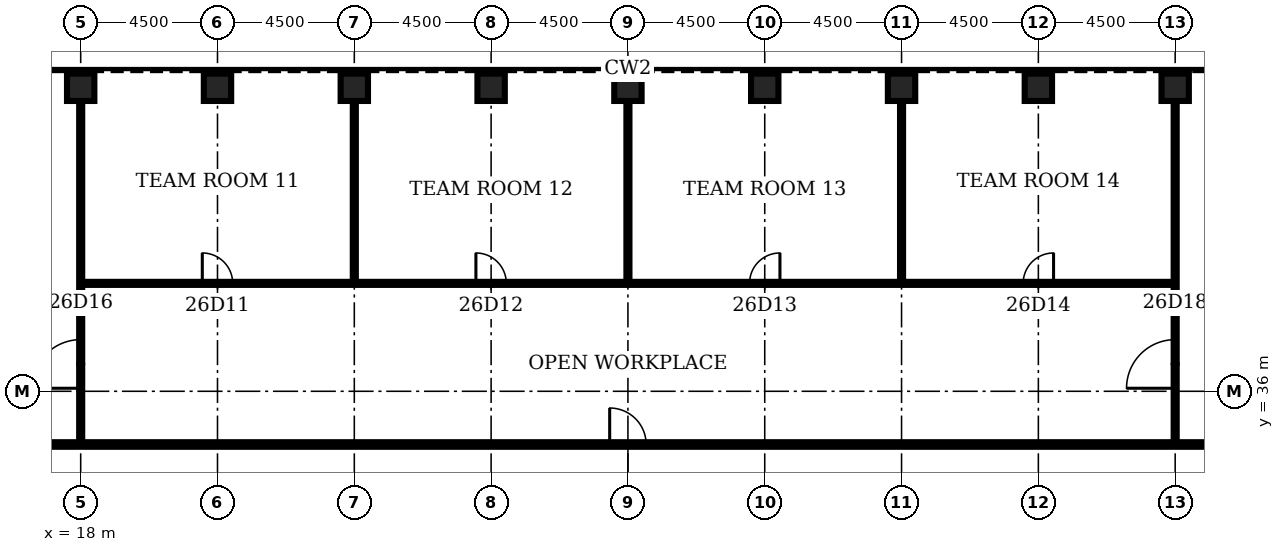
"""IFC4 building model, lengths in metres.
Left out: names, types, materials, properties, quantities, classifications, styles, units other than length and angle.
Written with IfcOpenShell. Run it as: python <this file> out.ifc"""

import sys

from ifc_helpers import new_model, si_unit, direction, frame, frame_2d, origin, origin_2d, place, context, subcontext, project, spatial, rectangle, hollow_rectangle, extrude, element, fill, save


model = new_model("IFC4")
c1 = context("Model", 3, precision=1e-05, world=origin(), true_north=direction((0.0, 1.0)))
c2 = subcontext(c1, "Body", "Model", "MODEL_VIEW")
j1 = project(units=[si_unit("LENGTHUNIT", "METRE"), si_unit("PLANEANGLEUNIT", "RADIAN")], contexts=[c1])
p1 = place(None, origin())
s1 = spatial("IfcSite", under=j1, at=p1, CompositionType="ELEMENT")
p2 = place(p1, origin())
s2 = spatial("IfcBuilding", under=s1, at=p2, CompositionType="ELEMENT")
p3 = place(p2, frame((0.0, 0.0, 121.5)))
s3 = spatial("IfcBuildingStorey", under=s2, at=p3, CompositionType="ELEMENT", Elevation=121.5)
for number, where, z_axis, x_axis in (
    (1, (54.0, 46.0, 0.0), (0.0, 0.0, 1.0), (0.0, 1.0, 0.0)),
    (2, (49.5, 46.0, 0.0), (0.0, 0.0, 1.0), (0.0, 1.0, 0.0)),
    (3, (45.0, 46.0, 0.0), (0.0, 0.0, 1.0), (0.0, 1.0, 0.0)),
    (4, (40.5, 46.0, 0.0), (0.0, 0.0, 1.0), (0.0, 1.0, 0.0)),
    (5, (36.0, 46.0, 0.0), (0.0, 0.0, 1.0), (0.0, 1.0, 0.0)),
    (6, (31.5, 46.0, 0.0), (0.0, 0.0, 1.0), (0.0, 1.0, 0.0)),
    (7, (27.0, 46.0, 0.0), (0.0, 0.0, 1.0), (0.0, 1.0, 0.0)),
    (8, (22.5, 46.0, 0.0), (0.0, 0.0, 1.0), (0.0, 1.0, 0.0)),
    (9, (18.0, 46.0, 0.0), (0.0, 0.0, 1.0), (0.0, 1.0, 0.0)),
):
    element("IfcColumn", number, at=place(p3, frame(where, z_axis=z_axis, x_axis=x_axis)), inside=s3, PredefinedType="COLUMN", context=c2, shape_type="SweptSolid", body=[
        extrude(hollow_rectangle(XDim=0.9, YDim=0.9, WallThickness=0.1, at=origin_2d()), origin(), (0.0, 0.0, 1.0), 4.2),
    ])
p4 = place(p3, frame((15.15, 34.25, 0.0), z_axis=(0.0, 0.0, 1.0), x_axis=(1.0, 0.0, 0.0)))
e10 = element("IfcWall", 10, at=p4, inside=s3, PredefinedType="PARTITIONING", context=c2, shape_type="SweptSolid", body=[
    extrude(rectangle(XDim=41.7, YDim=0.15, at=frame_2d((20.85, 0.0))), origin(), (0.0, 0.0, 1.0), 3.0),
])
p5 = place(p4, frame((20.25, 0.0, 0.0)))
e11 = element("IfcOpeningElement", 11, at=p5, cuts=e10, PredefinedType="OPENING", context=c2, shape_type="SweptSolid", body=[
    extrude(rectangle(XDim=1.2, YDim=2.1, at=frame_2d((0.6, 1.05))), frame((0.0, 0.085, 0.0), z_axis=(0.0, -1.0, 0.0), x_axis=(1.0, 0.0, 0.0)), (0.0, 0.0, 1.0), 0.17),
])
p6 = place(p3, frame((18.0, 39.55, 0.0), z_axis=(0.0, 0.0, 1.0), x_axis=(1.0, 0.0, 0.0)))
e12 = element("IfcWall", 12, at=p6, inside=s3, PredefinedType="PARTITIONING", context=c2, shape_type="SweptSolid", body=[
    extrude(rectangle(XDim=36.0, YDim=0.1, at=frame_2d((18.0, 0.0))), origin(), (0.0, 0.0, 1.0), 3.0),
])
p7 = place(p6, frame((4.0, 0.0, 0.0)))
e13 = element("IfcOpeningElement", 13, at=p7, cuts=e12, PredefinedType="OPENING", context=c2, shape_type="SweptSolid", body=[
    extrude(rectangle(XDim=1.0, YDim=2.1, at=frame_2d((0.5, 1.05))), frame((0.0, 0.06, 0.0), z_axis=(0.0, -1.0, 0.0), x_axis=(1.0, 0.0, 0.0)), (0.0, 0.0, 1.0), 0.12),
])
p8 = place(p6, frame((13.0, 0.0, 0.0)))
e14 = element("IfcOpeningElement", 14, at=p8, cuts=e12, PredefinedType="OPENING", context=c2, shape_type="SweptSolid", body=[
    extrude(rectangle(XDim=1.0, YDim=2.1, at=frame_2d((0.5, 1.05))), frame((0.0, 0.06, 0.0), z_axis=(0.0, -1.0, 0.0), x_axis=(1.0, 0.0, 0.0)), (0.0, 0.0, 1.0), 0.12),
])
p9 = place(p6, frame((22.0, 0.0, 0.0)))
e15 = element("IfcOpeningElement", 15, at=p9, cuts=e12, PredefinedType="OPENING", context=c2, shape_type="SweptSolid", body=[
    extrude(rectangle(XDim=1.0, YDim=2.1, at=frame_2d((0.5, 1.05))), frame((0.0, 0.06, 0.0), z_axis=(0.0, -1.0, 0.0), x_axis=(1.0, 0.0, 0.0)), (0.0, 0.0, 1.0), 0.12),
])
p10 = place(p6, frame((31.0, 0.0, 0.0)))
e16 = element("IfcOpeningElement", 16, at=p10, cuts=e12, PredefinedType="OPENING", context=c2, shape_type="SweptSolid", body=[
    extrude(rectangle(XDim=1.0, YDim=2.1, at=frame_2d((0.5, 1.05))), frame((0.0, 0.06, 0.0), z_axis=(0.0, -1.0, 0.0), x_axis=(1.0, 0.0, 0.0)), (0.0, 0.0, 1.0), 0.12),
])
p11 = place(p3, frame((18.0, 34.25, 0.0), z_axis=(0.0, 0.0, 1.0), x_axis=(0.0, 1.0, 0.0)))
e17 = element("IfcWall", 17, at=p11, inside=s3, PredefinedType="PARTITIONING", context=c2, shape_type="SweptSolid", body=[
    extrude(rectangle(XDim=11.3, YDim=0.1, at=frame_2d((5.65, 0.0))), origin(), (0.0, 0.0, 1.0), 3.0),
])
p12 = place(p11, frame((1.85, 0.0, 0.0)))
e18 = element("IfcOpeningElement", 18, at=p12, cuts=e17, PredefinedType="OPENING", context=c2, shape_type="SweptSolid", body=[
    extrude(rectangle(XDim=1.6, YDim=2.1, at=frame_2d((0.8, 1.05))), frame((0.0, 0.06, 0.0), z_axis=(0.0, -1.0, 0.0), x_axis=(1.0, 0.0, 0.0)), (0.0, 0.0, 1.0), 0.12),
])
for number, where, z_axis, x_axis in (
    (19, (27.0, 39.55, 0.0), (0.0, 0.0, 1.0), (0.0, 1.0, 0.0)),
    (20, (36.0, 39.55, 0.0), (0.0, 0.0, 1.0), (0.0, 1.0, 0.0)),
    (21, (45.0, 39.55, 0.0), (0.0, 0.0, 1.0), (0.0, 1.0, 0.0)),
):
    element("IfcWall", number, at=place(p3, frame(where, z_axis=z_axis, x_axis=x_axis)), inside=s3, PredefinedType="PARTITIONING", context=c2, shape_type="SweptSolid", body=[
        extrude(rectangle(XDim=6.0, YDim=0.1, at=frame_2d((3.0, 0.0))), origin(), (0.0, 0.0, 1.0), 3.0),
    ])
p13 = place(p3, frame((54.0, 34.25, 0.0), z_axis=(0.0, 0.0, 1.0), x_axis=(0.0, 1.0, 0.0)))
e22 = element("IfcWall", 22, at=p13, inside=s3, PredefinedType="PARTITIONING", context=c2, shape_type="SweptSolid", body=[
    extrude(rectangle(XDim=11.3, YDim=0.1, at=frame_2d((5.65, 0.0))), origin(), (0.0, 0.0, 1.0), 3.0),
])
p14 = place(p13, frame((1.85, 0.0, 0.0)))
e23 = element("IfcOpeningElement", 23, at=p14, cuts=e22, PredefinedType="OPENING", context=c2, shape_type="SweptSolid", body=[
    extrude(rectangle(XDim=1.6, YDim=2.1, at=frame_2d((0.8, 1.05))), frame((0.0, 0.06, 0.0), z_axis=(0.0, -1.0, 0.0), x_axis=(1.0, 0.0, 0.0)), (0.0, 0.0, 1.0), 0.12),
])
p15 = place(p7, origin())
e24 = element("IfcDoor", 24, at=p15, inside=s3, OperationType="SINGLE_SWING_LEFT", PredefinedType="DOOR", context=c2, shape_type="SweptSolid", body=[
    extrude(rectangle(XDim=1.0, YDim=2.1, at=frame_2d((0.5, 1.05))), frame((0.0, 0.025, 0.0), z_axis=(0.0, -1.0, 0.0), x_axis=(1.0, 0.0, 0.0)), (0.0, 0.0, 1.0), 0.05),
])
fill(e13, e24)
p16 = place(p8, origin())
e25 = element("IfcDoor", 25, at=p16, inside=s3, OperationType="SINGLE_SWING_LEFT", PredefinedType="DOOR", context=c2, shape_type="SweptSolid", body=[
    extrude(rectangle(XDim=1.0, YDim=2.1, at=frame_2d((0.5, 1.05))), frame((0.0, 0.025, 0.0), z_axis=(0.0, -1.0, 0.0), x_axis=(1.0, 0.0, 0.0)), (0.0, 0.0, 1.0), 0.05),
])
fill(e14, e25)
p17 = place(p9, origin())
e26 = element("IfcDoor", 26, at=p17, inside=s3, OperationType="SINGLE_SWING_RIGHT", PredefinedType="DOOR", context=c2, shape_type="SweptSolid", body=[
    extrude(rectangle(XDim=1.0, YDim=2.1, at=frame_2d((0.5, 1.05))), frame((0.0, 0.025, 0.0), z_axis=(0.0, -1.0, 0.0), x_axis=(1.0, 0.0, 0.0)), (0.0, 0.0, 1.0), 0.05),
])
fill(e15, e26)
p18 = place(p10, origin())
e27 = element("IfcDoor", 27, at=p18, inside=s3, OperationType="SINGLE_SWING_RIGHT", PredefinedType="DOOR", context=c2, shape_type="SweptSolid", body=[
    extrude(rectangle(XDim=1.0, YDim=2.1, at=frame_2d((0.5, 1.05))), frame((0.0, 0.025, 0.0), z_axis=(0.0, -1.0, 0.0), x_axis=(1.0, 0.0, 0.0)), (0.0, 0.0, 1.0), 0.05),
])
fill(e16, e27)
p19 = place(p12, origin())
e28 = element("IfcDoor", 28, at=p19, inside=s3, OperationType="SINGLE_SWING_LEFT", PredefinedType="DOOR", context=c2, shape_type="SweptSolid", body=[
    extrude(rectangle(XDim=1.6, YDim=2.1, at=frame_2d((0.8, 1.05))), frame((0.0, 0.025, 0.0), z_axis=(0.0, -1.0, 0.0), x_axis=(1.0, 0.0, 0.0)), (0.0, 0.0, 1.0), 0.05),
])
fill(e18, e28)
p20 = place(p14, origin())
e29 = element("IfcDoor", 29, at=p20, inside=s3, OperationType="SINGLE_SWING_LEFT", PredefinedType="DOOR", context=c2, shape_type="SweptSolid", body=[
    extrude(rectangle(XDim=1.6, YDim=2.1, at=frame_2d((0.8, 1.05))), frame((0.0, 0.025, 0.0), z_axis=(0.0, -1.0, 0.0), x_axis=(1.0, 0.0, 0.0)), (0.0, 0.0, 1.0), 0.05),
])
fill(e23, e29)
p21 = place(p5, origin())
e30 = element("IfcDoor", 30, at=p21, inside=s3, OperationType="SINGLE_SWING_LEFT", PredefinedType="DOOR", context=c2, shape_type="SweptSolid", body=[
    extrude(rectangle(XDim=1.2, YDim=2.1, at=frame_2d((0.6, 1.05))), frame((0.0, 0.025, 0.0), z_axis=(0.0, -1.0, 0.0), x_axis=(1.0, 0.0, 0.0)), (0.0, 0.0, 1.0), 0.05),
])
fill(e11, e30)
save(model, sys.argv[1])
